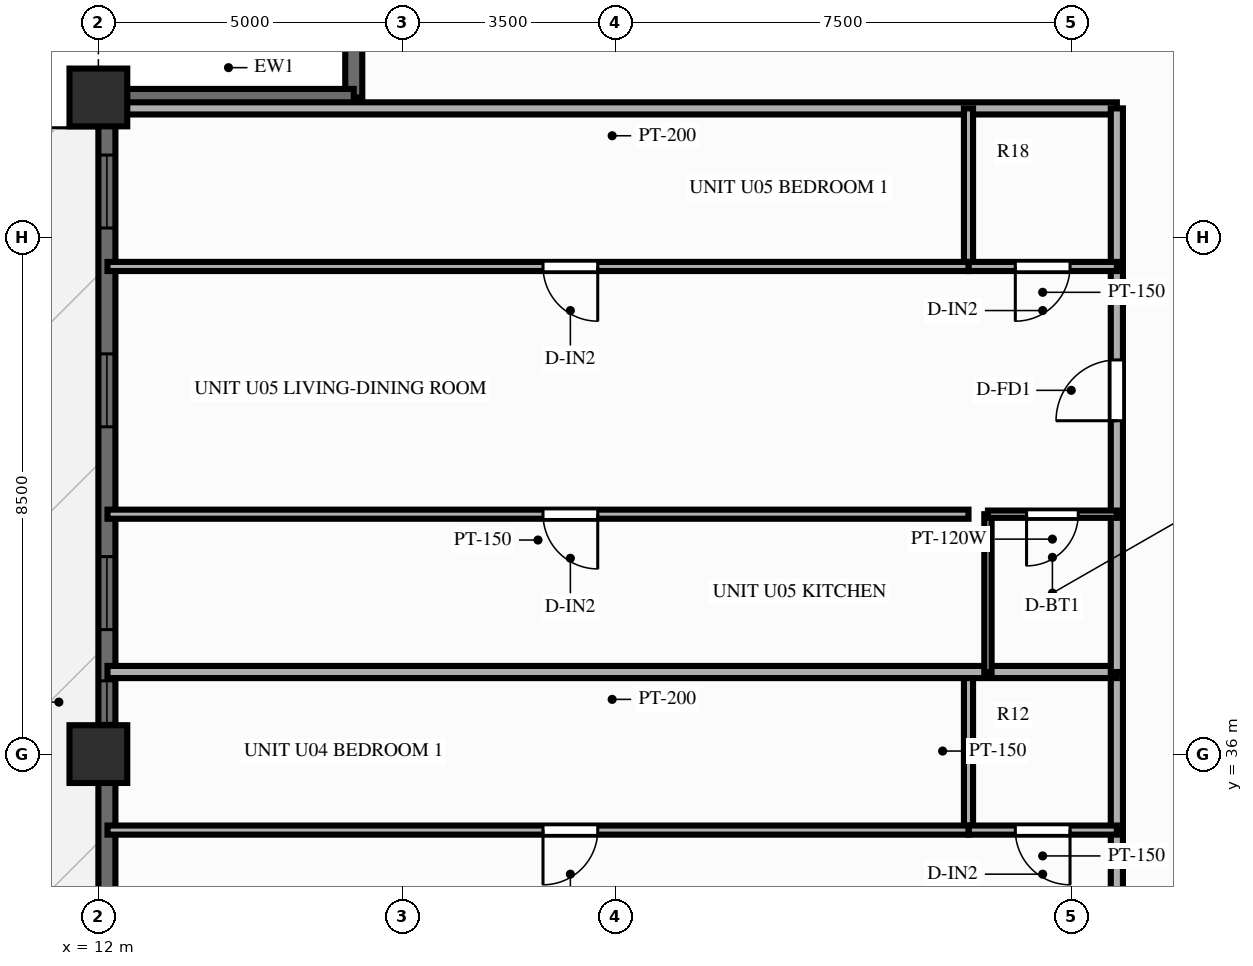
"""IFC4 building model, lengths in metres.
Left out: names, types, materials, properties, quantities, classifications, styles, units other than length and angle.
Written with IfcOpenShell. Run it as: python <this file> out.ifc"""

import sys

from ifc_helpers import new_model, si_unit, direction, frame, frame_2d, origin, origin_2d, place, context, subcontext, project, spatial, rectangle, extrude, source, transform, mapped, element, fill, save


model = new_model("IFC4")
c1 = context("Model", 3, precision=1e-05, world=origin(), true_north=direction((0.0, 1.0)))
c2 = subcontext(c1, "Body", "Model", "MODEL_VIEW")
j1 = project(units=[si_unit("LENGTHUNIT", "METRE"), si_unit("PLANEANGLEUNIT", "RADIAN")], contexts=[c1])
p1 = place(None, origin())
s1 = spatial("IfcSite", under=j1, at=p1, CompositionType="ELEMENT")
p2 = place(p1, origin())
s2 = spatial("IfcBuilding", under=s1, at=p2, CompositionType="ELEMENT")
p3 = place(p2, frame((0.0, 0.0, 141.75)))
s3 = spatial("IfcBuildingStorey", under=s2, at=p3, CompositionType="ELEMENT", Elevation=141.75)
m1 = source(origin(), c2, "Body", "SweptSolid", [
    extrude(rectangle(XDim=0.95, YDim=0.95, at=origin_2d()), origin(), (0.0, 0.0, 1.0), 3.0),
])
for number, where, z_axis, x_axis in (
    (1, (12.0, 46.8, 0.0), (0.0, 0.0, 1.0), (1.0, 0.0, 0.0)),
    (2, (12.0, 36.0, 0.0), (0.0, 0.0, 1.0), (1.0, 0.0, 0.0)),
):
    element("IfcColumn", number, at=place(p3, frame(where, z_axis=z_axis, x_axis=x_axis)), inside=s3, PredefinedType="COLUMN", context=c2, shape_type="MappedRepresentation", body=[
        mapped(m1, transform((0.0, 0.0, 0.0), scale=1.0)),
    ])
p4 = place(p3, frame((12.14, 7.2, 0.0), z_axis=(0.0, 0.0, 1.0), x_axis=(0.0, 1.0, 0.0)))
e3 = element("IfcWall", 3, at=p4, inside=s3, PredefinedType="SOLIDWALL", context=c2, shape_type="SweptSolid", body=[
    extrude(rectangle(XDim=39.6, YDim=0.28, at=frame_2d((19.8, 0.0))), origin(), (0.0, 0.0, 1.0), 2.28),
])
p5 = place(p4, frame((0.945, 0.0, 0.25)))
e4 = element("IfcOpeningElement", 4, at=p5, cuts=e3, PredefinedType="OPENING", context=c2, shape_type="SweptSolid", body=[
    extrude(rectangle(XDim=1.2, YDim=1.5, at=frame_2d((0.6, 0.75))), frame((0.0, 0.152, 0.0), z_axis=(0.0, -1.0, 0.0), x_axis=(1.0, 0.0, 0.0)), (0.0, 0.0, 1.0), 0.304),
])
p6 = place(p4, frame((4.213, 0.0, 0.25)))
e5 = element("IfcOpeningElement", 5, at=p6, cuts=e3, PredefinedType="OPENING", context=c2, shape_type="SweptSolid", body=[
    extrude(rectangle(XDim=1.2, YDim=1.5, at=frame_2d((0.6, 0.75))), frame((0.0, 0.152, 0.0), z_axis=(0.0, -1.0, 0.0), x_axis=(1.0, 0.0, 0.0)), (0.0, 0.0, 1.0), 0.304),
])
p7 = place(p4, frame((7.55, 0.0, 0.25)))
e6 = element("IfcOpeningElement", 6, at=p7, cuts=e3, PredefinedType="OPENING", context=c2, shape_type="SweptSolid", body=[
    extrude(rectangle(XDim=1.2, YDim=1.5, at=frame_2d((0.6, 0.75))), frame((0.0, 0.152, 0.0), z_axis=(0.0, -1.0, 0.0), x_axis=(1.0, 0.0, 0.0)), (0.0, 0.0, 1.0), 0.304),
])
p8 = place(p4, frame((13.483, 0.0, 0.25)))
e7 = element("IfcOpeningElement", 7, at=p8, cuts=e3, PredefinedType="OPENING", context=c2, shape_type="SweptSolid", body=[
    extrude(rectangle(XDim=1.2, YDim=1.5, at=frame_2d((0.6, 0.75))), frame((0.0, 0.152, 0.0), z_axis=(0.0, -1.0, 0.0), x_axis=(1.0, 0.0, 0.0)), (0.0, 0.0, 1.0), 0.304),
])
p9 = place(p4, frame((16.82, 0.0, 0.25)))
e8 = element("IfcOpeningElement", 8, at=p9, cuts=e3, PredefinedType="OPENING", context=c2, shape_type="SweptSolid", body=[
    extrude(rectangle(XDim=1.2, YDim=1.5, at=frame_2d((0.6, 0.75))), frame((0.0, 0.152, 0.0), z_axis=(0.0, -1.0, 0.0), x_axis=(1.0, 0.0, 0.0)), (0.0, 0.0, 1.0), 0.304),
])
p10 = place(p4, frame((19.2, 0.0, 0.25)))
e9 = element("IfcOpeningElement", 9, at=p10, cuts=e3, PredefinedType="OPENING", context=c2, shape_type="SweptSolid", body=[
    extrude(rectangle(XDim=1.2, YDim=1.5, at=frame_2d((0.6, 0.75))), frame((0.0, 0.152, 0.0), z_axis=(0.0, -1.0, 0.0), x_axis=(1.0, 0.0, 0.0)), (0.0, 0.0, 1.0), 0.304),
])
p11 = place(p4, frame((21.578, 0.0, 0.25)))
e10 = element("IfcOpeningElement", 10, at=p11, cuts=e3, PredefinedType="OPENING", context=c2, shape_type="SweptSolid", body=[
    extrude(rectangle(XDim=1.2, YDim=1.5, at=frame_2d((0.6, 0.75))), frame((0.0, 0.152, 0.0), z_axis=(0.0, -1.0, 0.0), x_axis=(1.0, 0.0, 0.0)), (0.0, 0.0, 1.0), 0.304),
])
p12 = place(p4, frame((24.713, 0.0, 0.0)))
e11 = element("IfcOpeningElement", 11, at=p12, cuts=e3, PredefinedType="OPENING", context=c2, shape_type="SweptSolid", body=[
    extrude(rectangle(XDim=1.6, YDim=2.15, at=frame_2d((0.8, 1.075))), frame((0.0, 0.152, 0.0), z_axis=(0.0, -1.0, 0.0), x_axis=(1.0, 0.0, 0.0)), (0.0, 0.0, 1.0), 0.304),
])
p13 = place(p4, frame((29.305, 0.0, 0.25)))
e12 = element("IfcOpeningElement", 12, at=p13, cuts=e3, PredefinedType="OPENING", context=c2, shape_type="SweptSolid", body=[
    extrude(rectangle(XDim=0.7, YDim=1.5, at=frame_2d((0.35, 0.75))), frame((0.0, 0.152, 0.0), z_axis=(0.0, -1.0, 0.0), x_axis=(1.0, 0.0, 0.0)), (0.0, 0.0, 1.0), 0.304),
])
p14 = place(p4, frame((30.848, 0.0, 0.25)))
e13 = element("IfcOpeningElement", 13, at=p14, cuts=e3, PredefinedType="OPENING", context=c2, shape_type="SweptSolid", body=[
    extrude(rectangle(XDim=1.2, YDim=1.5, at=frame_2d((0.6, 0.75))), frame((0.0, 0.152, 0.0), z_axis=(0.0, -1.0, 0.0), x_axis=(1.0, 0.0, 0.0)), (0.0, 0.0, 1.0), 0.304),
])
p15 = place(p4, frame((34.183, 0.0, 0.25)))
e14 = element("IfcOpeningElement", 14, at=p15, cuts=e3, PredefinedType="OPENING", context=c2, shape_type="SweptSolid", body=[
    extrude(rectangle(XDim=1.2, YDim=1.5, at=frame_2d((0.6, 0.75))), frame((0.0, 0.152, 0.0), z_axis=(0.0, -1.0, 0.0), x_axis=(1.0, 0.0, 0.0)), (0.0, 0.0, 1.0), 0.304),
])
p16 = place(p4, frame((37.452, 0.0, 0.25)))
e15 = element("IfcOpeningElement", 15, at=p16, cuts=e3, PredefinedType="OPENING", context=c2, shape_type="SweptSolid", body=[
    extrude(rectangle(XDim=1.2, YDim=1.5, at=frame_2d((0.6, 0.75))), frame((0.0, 0.152, 0.0), z_axis=(0.0, -1.0, 0.0), x_axis=(1.0, 0.0, 0.0)), (0.0, 0.0, 1.0), 0.304),
])
for number, where, z_axis, x_axis in (
    (16, (16.2, 46.8, 0.0), (0.0, 0.0, 1.0), (0.0, 1.0, 0.0)),
    (17, (12.08, 46.8, 0.0), (0.0, 0.0, 1.0), (1.0, 0.0, 0.0)),
):
    element("IfcWall", number, at=place(p3, frame(where, z_axis=z_axis, x_axis=x_axis)), inside=s3, PredefinedType="SOLIDWALL", context=c2, shape_type="SweptSolid", body=[
        extrude(rectangle(XDim=4.12, YDim=0.28, at=frame_2d((2.06, 0.0))), origin(), (0.0, 0.0, 1.0), 2.28),
    ])
p17 = place(p3, frame((28.75, 46.62, 0.0), z_axis=(0.0, 0.0, 1.0), x_axis=(-1.0, 0.0, 0.0)))
e18 = element("IfcWall", 18, at=p17, inside=s3, PredefinedType="PARTITIONING", context=c2, shape_type="SweptSolid", body=[
    extrude(rectangle(XDim=16.6, YDim=0.2, at=frame_2d((8.3, 0.0))), origin(), (0.0, 0.0, 1.0), 2.7),
])
p18 = place(p3, frame((28.75, 30.676, 0.0), z_axis=(0.0, 0.0, 1.0), x_axis=(0.0, 1.0, 0.0)))
e19 = element("IfcWall", 19, at=p18, inside=s3, PredefinedType="PARTITIONING", context=c2, shape_type="SweptSolid", body=[
    extrude(rectangle(XDim=4.074, YDim=0.2, at=frame_2d((2.037, 0.0))), origin(), (0.0, 0.0, 1.0), 2.7),
])
p19 = place(p18, frame((1.537, 0.0, 0.0)))
e20 = element("IfcOpeningElement", 20, at=p19, cuts=e19, PredefinedType="OPENING", context=c2, shape_type="SweptSolid", body=[
    extrude(rectangle(XDim=1.0, YDim=2.15, at=frame_2d((0.5, 1.075))), frame((0.0, 0.112, 0.0), z_axis=(0.0, -1.0, 0.0), x_axis=(1.0, 0.0, 0.0)), (0.0, 0.0, 1.0), 0.224),
])
p20 = place(p3, frame((28.75, 34.75, 0.0), z_axis=(0.0, 0.0, 1.0), x_axis=(0.0, 1.0, 0.0)))
e21 = element("IfcWall", 21, at=p20, inside=s3, PredefinedType="PARTITIONING", context=c2, shape_type="SweptSolid", body=[
    extrude(rectangle(XDim=2.6, YDim=0.2, at=frame_2d((1.3, 0.0))), origin(), (0.0, 0.0, 1.0), 2.7),
])
p21 = place(p3, frame((26.31, 34.75, 0.0), z_axis=(0.0, 0.0, 1.0), x_axis=(0.0, 1.0, 0.0)))
e22 = element("IfcWall", 22, at=p21, inside=s3, PredefinedType="PARTITIONING", context=c2, shape_type="SweptSolid", body=[
    extrude(rectangle(XDim=2.6, YDim=0.15, at=frame_2d((1.3, 0.0))), origin(), (0.0, 0.0, 1.0), 2.7),
])
p22 = place(p3, frame((28.75, 34.75, 0.0), z_axis=(0.0, 0.0, 1.0), x_axis=(-1.0, 0.0, 0.0)))
e23 = element("IfcWall", 23, at=p22, inside=s3, PredefinedType="PARTITIONING", context=c2, shape_type="SweptSolid", body=[
    extrude(rectangle(XDim=2.44, YDim=0.15, at=frame_2d((1.22, 0.0))), origin(), (0.0, 0.0, 1.0), 2.7),
])
p23 = place(p22, frame((0.77, 0.0, 0.0)))
e24 = element("IfcOpeningElement", 24, at=p23, cuts=e23, PredefinedType="OPENING", context=c2, shape_type="SweptSolid", body=[
    extrude(rectangle(XDim=0.9, YDim=2.1, at=frame_2d((0.45, 1.05))), frame((0.0, 0.087, 0.0), z_axis=(0.0, -1.0, 0.0), x_axis=(1.0, 0.0, 0.0)), (0.0, 0.0, 1.0), 0.174),
])
p24 = place(p3, frame((26.31, 34.75, 0.0), z_axis=(0.0, 0.0, 1.0), x_axis=(-1.0, 0.0, 0.0)))
e25 = element("IfcWall", 25, at=p24, inside=s3, PredefinedType="PARTITIONING", context=c2, shape_type="SweptSolid", body=[
    extrude(rectangle(XDim=14.16, YDim=0.15, at=frame_2d((7.08, 0.0))), origin(), (0.0, 0.0, 1.0), 2.7),
])
p25 = place(p24, frame((6.097, 0.0, 0.0)))
e26 = element("IfcOpeningElement", 26, at=p25, cuts=e25, PredefinedType="OPENING", context=c2, shape_type="SweptSolid", body=[
    extrude(rectangle(XDim=0.9, YDim=2.1, at=frame_2d((0.45, 1.05))), frame((0.0, 0.087, 0.0), z_axis=(0.0, -1.0, 0.0), x_axis=(1.0, 0.0, 0.0)), (0.0, 0.0, 1.0), 0.174),
])
p26 = place(p3, frame((28.75, 37.35, 0.0), z_axis=(0.0, 0.0, 1.0), x_axis=(-1.0, 0.0, 0.0)))
e27 = element("IfcWall", 27, at=p26, inside=s3, PredefinedType="PARTITIONING", context=c2, shape_type="SweptSolid", body=[
    extrude(rectangle(XDim=16.6, YDim=0.2, at=frame_2d((8.3, 0.0))), origin(), (0.0, 0.0, 1.0), 2.7),
])
p27 = place(p3, frame((28.75, 37.35, 0.0), z_axis=(0.0, 0.0, 1.0), x_axis=(0.0, 1.0, 0.0)))
e28 = element("IfcWall", 28, at=p27, inside=s3, PredefinedType="PARTITIONING", context=c2, shape_type="SweptSolid", body=[
    extrude(rectangle(XDim=2.595, YDim=0.2, at=frame_2d((1.298, 0.0))), origin(), (0.0, 0.0, 1.0), 2.7),
])
p28 = place(p3, frame((28.75, 39.946, 0.0), z_axis=(0.0, 0.0, 1.0), x_axis=(0.0, 1.0, 0.0)))
e29 = element("IfcWall", 29, at=p28, inside=s3, PredefinedType="PARTITIONING", context=c2, shape_type="SweptSolid", body=[
    extrude(rectangle(XDim=4.074, YDim=0.2, at=frame_2d((2.037, 0.0))), origin(), (0.0, 0.0, 1.0), 2.7),
])
p29 = place(p28, frame((1.537, 0.0, 0.0)))
e30 = element("IfcOpeningElement", 30, at=p29, cuts=e29, PredefinedType="OPENING", context=c2, shape_type="SweptSolid", body=[
    extrude(rectangle(XDim=1.0, YDim=2.15, at=frame_2d((0.5, 1.075))), frame((0.0, 0.112, 0.0), z_axis=(0.0, -1.0, 0.0), x_axis=(1.0, 0.0, 0.0)), (0.0, 0.0, 1.0), 0.224),
])
p30 = place(p3, frame((28.75, 44.02, 0.0), z_axis=(0.0, 0.0, 1.0), x_axis=(0.0, 1.0, 0.0)))
e31 = element("IfcWall", 31, at=p30, inside=s3, PredefinedType="PARTITIONING", context=c2, shape_type="SweptSolid", body=[
    extrude(rectangle(XDim=2.6, YDim=0.2, at=frame_2d((1.3, 0.0))), origin(), (0.0, 0.0, 1.0), 2.7),
])
p31 = place(p3, frame((26.63, 37.35, 0.0), z_axis=(0.0, 0.0, 1.0), x_axis=(0.0, 1.0, 0.0)))
e32 = element("IfcWall", 32, at=p31, inside=s3, PredefinedType="PARTITIONING", context=c2, shape_type="SweptSolid", body=[
    extrude(rectangle(XDim=2.595, YDim=0.12, at=frame_2d((1.298, 0.0))), origin(), (0.0, 0.0, 1.0), 2.7),
])
p32 = place(p3, frame((26.31, 44.02, 0.0), z_axis=(0.0, 0.0, 1.0), x_axis=(0.0, 1.0, 0.0)))
e33 = element("IfcWall", 33, at=p32, inside=s3, PredefinedType="PARTITIONING", context=c2, shape_type="SweptSolid", body=[
    extrude(rectangle(XDim=2.6, YDim=0.15, at=frame_2d((1.3, 0.0))), origin(), (0.0, 0.0, 1.0), 2.7),
])
p33 = place(p3, frame((28.75, 39.946, 0.0), z_axis=(0.0, 0.0, 1.0), x_axis=(-1.0, 0.0, 0.0)))
e34 = element("IfcWall", 34, at=p33, inside=s3, PredefinedType="PARTITIONING", context=c2, shape_type="SweptSolid", body=[
    extrude(rectangle(XDim=2.12, YDim=0.12, at=frame_2d((1.06, 0.0))), origin(), (0.0, 0.0, 1.0), 2.7),
])
p34 = place(p33, frame((0.635, 0.0, 0.0)))
e35 = element("IfcOpeningElement", 35, at=p34, cuts=e34, PredefinedType="OPENING", context=c2, shape_type="SweptSolid", body=[
    extrude(rectangle(XDim=0.85, YDim=2.05, at=frame_2d((0.425, 1.025))), frame((0.0, 0.072, 0.0), z_axis=(0.0, -1.0, 0.0), x_axis=(1.0, 0.0, 0.0)), (0.0, 0.0, 1.0), 0.144),
])
p35 = place(p3, frame((26.31, 39.946, 0.0), z_axis=(0.0, 0.0, 1.0), x_axis=(-1.0, 0.0, 0.0)))
e36 = element("IfcWall", 36, at=p35, inside=s3, PredefinedType="PARTITIONING", context=c2, shape_type="SweptSolid", body=[
    extrude(rectangle(XDim=14.16, YDim=0.15, at=frame_2d((7.08, 0.0))), origin(), (0.0, 0.0, 1.0), 2.7),
])
p36 = place(p35, frame((6.097, 0.0, 0.0)))
e37 = element("IfcOpeningElement", 37, at=p36, cuts=e36, PredefinedType="OPENING", context=c2, shape_type="SweptSolid", body=[
    extrude(rectangle(XDim=0.9, YDim=2.1, at=frame_2d((0.45, 1.05))), frame((0.0, 0.087, 0.0), z_axis=(0.0, -1.0, 0.0), x_axis=(1.0, 0.0, 0.0)), (0.0, 0.0, 1.0), 0.174),
])
p37 = place(p3, frame((28.75, 44.02, 0.0), z_axis=(0.0, 0.0, 1.0), x_axis=(-1.0, 0.0, 0.0)))
e38 = element("IfcWall", 38, at=p37, inside=s3, PredefinedType="PARTITIONING", context=c2, shape_type="SweptSolid", body=[
    extrude(rectangle(XDim=2.44, YDim=0.15, at=frame_2d((1.22, 0.0))), origin(), (0.0, 0.0, 1.0), 2.7),
])
p38 = place(p37, frame((0.77, 0.0, 0.0)))
e39 = element("IfcOpeningElement", 39, at=p38, cuts=e38, PredefinedType="OPENING", context=c2, shape_type="SweptSolid", body=[
    extrude(rectangle(XDim=0.9, YDim=2.1, at=frame_2d((0.45, 1.05))), frame((0.0, 0.087, 0.0), z_axis=(0.0, -1.0, 0.0), x_axis=(1.0, 0.0, 0.0)), (0.0, 0.0, 1.0), 0.174),
])
p39 = place(p3, frame((26.31, 44.02, 0.0), z_axis=(0.0, 0.0, 1.0), x_axis=(-1.0, 0.0, 0.0)))
e40 = element("IfcWall", 40, at=p39, inside=s3, PredefinedType="PARTITIONING", context=c2, shape_type="SweptSolid", body=[
    extrude(rectangle(XDim=14.16, YDim=0.15, at=frame_2d((7.08, 0.0))), origin(), (0.0, 0.0, 1.0), 2.7),
])
p40 = place(p39, frame((6.097, 0.0, 0.0)))
e41 = element("IfcOpeningElement", 41, at=p40, cuts=e40, PredefinedType="OPENING", context=c2, shape_type="SweptSolid", body=[
    extrude(rectangle(XDim=0.9, YDim=2.1, at=frame_2d((0.45, 1.05))), frame((0.0, 0.087, 0.0), z_axis=(0.0, -1.0, 0.0), x_axis=(1.0, 0.0, 0.0)), (0.0, 0.0, 1.0), 0.174),
])
m2 = source(origin(), c2, "Body", "SweptSolid", [
    extrude(rectangle(XDim=0.7, YDim=1.5, at=frame_2d((0.35, 0.75))), frame((0.0, 0.03, 0.0), z_axis=(0.0, -1.0, 0.0), x_axis=(1.0, 0.0, 0.0)), (0.0, 0.0, 1.0), 0.06),
])
p41 = place(p13, origin())
e42 = element("IfcWindow", 42, at=p41, inside=s3, PartitioningType="SINGLE_PANEL", PredefinedType="WINDOW", context=c2, shape_type="MappedRepresentation", body=[
    mapped(m2, transform((0.0, 0.0, 0.0), scale=1.0)),
])
fill(e12, e42)
m3 = source(origin(), c2, "Body", "SweptSolid", [
    extrude(rectangle(XDim=1.2, YDim=1.5, at=frame_2d((0.6, 0.75))), frame((0.0, 0.03, 0.0), z_axis=(0.0, -1.0, 0.0), x_axis=(1.0, 0.0, 0.0)), (0.0, 0.0, 1.0), 0.06),
])
p42 = place(p14, origin())
e43 = element("IfcWindow", 43, at=p42, inside=s3, PartitioningType="SINGLE_PANEL", PredefinedType="WINDOW", context=c2, shape_type="MappedRepresentation", body=[
    mapped(m3, transform((0.0, 0.0, 0.0), scale=1.0)),
])
fill(e13, e43)
p43 = place(p15, origin())
e44 = element("IfcWindow", 44, at=p43, inside=s3, PartitioningType="SINGLE_PANEL", PredefinedType="WINDOW", context=c2, shape_type="MappedRepresentation", body=[
    mapped(m3, transform((0.0, 0.0, 0.0), scale=1.0)),
])
fill(e14, e44)
p44 = place(p16, origin())
e45 = element("IfcWindow", 45, at=p44, inside=s3, PartitioningType="SINGLE_PANEL", PredefinedType="WINDOW", context=c2, shape_type="MappedRepresentation", body=[
    mapped(m3, transform((0.0, 0.0, 0.0), scale=1.0)),
])
fill(e15, e45)
m4 = source(origin(), c2, "Body", "SweptSolid", [
    extrude(rectangle(XDim=0.9, YDim=2.1, at=frame_2d((0.45, 1.05))), frame((0.0, 0.025, 0.0), z_axis=(0.0, -1.0, 0.0), x_axis=(1.0, 0.0, 0.0)), (0.0, 0.0, 1.0), 0.05),
])
p45 = place(p23, origin())
e46 = element("IfcDoor", 46, at=p45, inside=s3, OperationType="SINGLE_SWING_LEFT", PredefinedType="DOOR", context=c2, shape_type="MappedRepresentation", body=[
    mapped(m4, transform((0.0, 0.0, 0.0), scale=1.0)),
])
fill(e24, e46)
p46 = place(p25, origin())
e47 = element("IfcDoor", 47, at=p46, inside=s3, OperationType="SINGLE_SWING_RIGHT", PredefinedType="DOOR", context=c2, shape_type="MappedRepresentation", body=[
    mapped(m4, transform((0.0, 0.0, 0.0), scale=1.0)),
])
fill(e26, e47)
m5 = source(origin(), c2, "Body", "SweptSolid", [
    extrude(rectangle(XDim=1.0, YDim=2.15, at=frame_2d((0.5, 1.075))), frame((0.0, 0.025, 0.0), z_axis=(0.0, -1.0, 0.0), x_axis=(1.0, 0.0, 0.0)), (0.0, 0.0, 1.0), 0.05),
])
p47 = place(p29, origin())
e48 = element("IfcDoor", 48, at=p47, inside=s3, OperationType="SINGLE_SWING_LEFT", PredefinedType="DOOR", context=c2, shape_type="MappedRepresentation", body=[
    mapped(m5, transform((0.0, 0.0, 0.0), scale=1.0)),
])
fill(e30, e48)
m6 = source(origin(), c2, "Body", "SweptSolid", [
    extrude(rectangle(XDim=0.85, YDim=2.05, at=frame_2d((0.425, 1.025))), frame((0.0, 0.025, 0.0), z_axis=(0.0, -1.0, 0.0), x_axis=(1.0, 0.0, 0.0)), (0.0, 0.0, 1.0), 0.05),
])
p48 = place(p34, origin())
e49 = element("IfcDoor", 49, at=p48, inside=s3, OperationType="SINGLE_SWING_RIGHT", PredefinedType="DOOR", context=c2, shape_type="MappedRepresentation", body=[
    mapped(m6, transform((0.0, 0.0, 0.0), scale=1.0)),
])
fill(e35, e49)
p49 = place(p36, origin())
e50 = element("IfcDoor", 50, at=p49, inside=s3, OperationType="SINGLE_SWING_LEFT", PredefinedType="DOOR", context=c2, shape_type="MappedRepresentation", body=[
    mapped(m4, transform((0.0, 0.0, 0.0), scale=1.0)),
])
fill(e37, e50)
p50 = place(p38, origin())
e51 = element("IfcDoor", 51, at=p50, inside=s3, OperationType="SINGLE_SWING_RIGHT", PredefinedType="DOOR", context=c2, shape_type="MappedRepresentation", body=[
    mapped(m4, transform((0.0, 0.0, 0.0), scale=1.0)),
])
fill(e39, e51)
p51 = place(p40, origin())
e52 = element("IfcDoor", 52, at=p51, inside=s3, OperationType="SINGLE_SWING_LEFT", PredefinedType="DOOR", context=c2, shape_type="MappedRepresentation", body=[
    mapped(m4, transform((0.0, 0.0, 0.0), scale=1.0)),
])
fill(e41, e52)
save(model, sys.argv[1])
